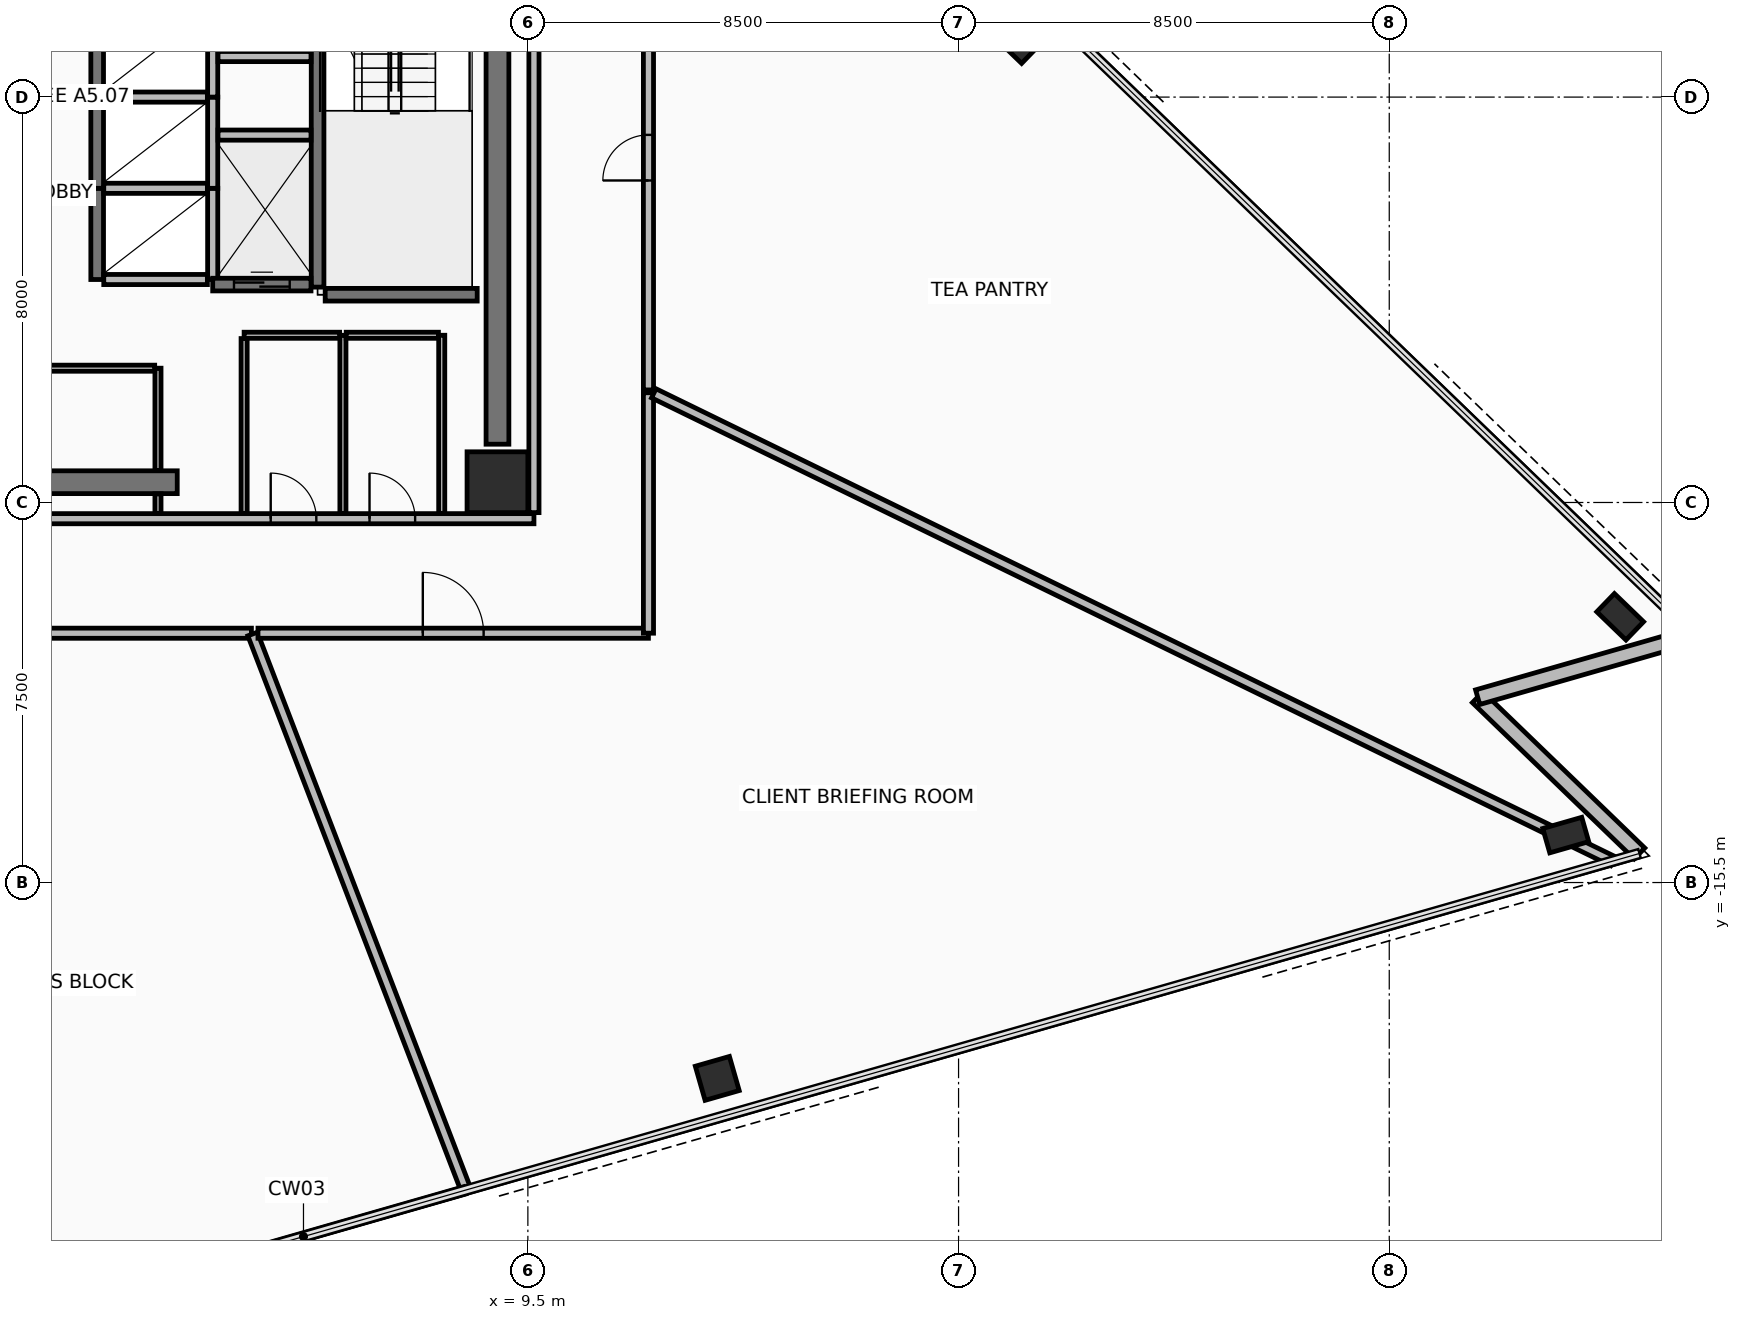
"""IFC4 building model, lengths in metres.
Left out: names, types, materials, properties, quantities, classifications, styles, units other than length and angle.
Written with IfcOpenShell. Run it as: python <this file> out.ifc"""

import sys

from ifc_helpers import new_model, si_unit, direction, frame, frame_2d, origin, origin_2d, place, context, subcontext, project, spatial, rectangle, hollow_rectangle, extrude, element, fill, save


model = new_model("IFC4")
c1 = context("Model", 3, precision=1e-05, world=origin(), true_north=direction((0.0, 1.0)))
c2 = subcontext(c1, "Body", "Model", "MODEL_VIEW")
j1 = project(units=[si_unit("LENGTHUNIT", "METRE"), si_unit("PLANEANGLEUNIT", "RADIAN")], contexts=[c1])
p1 = place(None, origin())
s1 = spatial("IfcSite", under=j1, at=p1, CompositionType="ELEMENT")
p2 = place(p1, origin())
s2 = spatial("IfcBuilding", under=s1, at=p2, CompositionType="ELEMENT")
p3 = place(p2, frame((0.0, 0.0, 86.1)))
s3 = spatial("IfcBuildingStorey", under=s2, at=p3, CompositionType="ELEMENT", Elevation=86.1)
p4 = place(p3, frame((8.9, -7.6, 0.0), z_axis=(0.0, 0.0, 1.0), x_axis=(1.0, 0.0, 0.0)))
e1 = element("IfcColumn", 1, at=p4, inside=s3, PredefinedType="COLUMN", context=c2, shape_type="SweptSolid", body=[
    extrude(rectangle(XDim=1.2, YDim=1.2, at=origin_2d()), origin(), (0.0, 0.0, 1.0), 3.6),
])
p5 = place(p3, frame((13.238, -19.365, 0.0), z_axis=(0.0, 0.0, 1.0), x_axis=(0.961261695938, 0.275637355817, 0.0)))
e2 = element("IfcColumn", 2, at=p5, inside=s3, PredefinedType="COLUMN", context=c2, shape_type="SweptSolid", body=[
    extrude(hollow_rectangle(XDim=0.7, YDim=0.7, WallThickness=0.04, at=origin_2d()), origin(), (0.0, 0.0, 1.0), 3.6),
])
for number, where, z_axis, x_axis in (
    (3, (29.983, -14.564, 0.0), (0.0, 0.0, 1.0), (0.961, 0.276, 0.0)),
    (4, (31.058, -10.256, 0.0), (0.0, 0.0, 1.0), (-0.719, 0.695, 0.0)),
):
    element("IfcColumn", number, at=place(p3, frame(where, z_axis=z_axis, x_axis=x_axis)), inside=s3, PredefinedType="COLUMN", context=c2, shape_type="SweptSolid", body=[
        extrude(hollow_rectangle(XDim=0.5, YDim=0.8, WallThickness=0.04, at=origin_2d()), origin(), (0.0, 0.0, 1.0), 3.6),
    ])
p6 = place(p3, frame((19.236, 1.16, -0.19), z_axis=(0.0, 0.0, 1.0), x_axis=(-0.719339800339, 0.694658370459, 0.0)))
e5 = element("IfcColumn", 5, at=p6, inside=s3, PredefinedType="COLUMN", context=c2, shape_type="SweptSolid", body=[
    extrude(hollow_rectangle(XDim=0.7, YDim=0.7, WallThickness=0.04, at=origin_2d()), origin(), (0.0, 0.0, 1.0), 3.79),
])
p7 = place(p3, frame((31.439, -14.927, 0.0), z_axis=(0.0, 0.0, 1.0), x_axis=(-0.719317126864, 0.694681848763, 0.0)))
e6 = element("IfcWall", 6, at=p7, inside=s3, PredefinedType="STANDARD", context=c2, shape_type="SweptSolid", body=[
    extrude(rectangle(XDim=4.44, YDim=0.3, at=frame_2d((2.22, 0.0))), origin(), (0.0, 0.0, 1.0), 2.605),
])
p8 = place(p3, frame((28.245, -11.842, 0.0), z_axis=(0.0, 0.0, 1.0), x_axis=(0.961255810825, 0.275657878821, 0.0)))
e7 = element("IfcWall", 7, at=p8, inside=s3, PredefinedType="STANDARD", context=c2, shape_type="SweptSolid", body=[
    extrude(rectangle(XDim=4.44, YDim=0.3, at=frame_2d((2.22, 0.0))), origin(), (0.0, 0.0, 1.0), 2.605),
])
p9 = place(p3, frame((-2.8, -7.6, 0.0), z_axis=(0.0, 0.0, 1.0), x_axis=(1.0, 0.0, 0.0)))
e8 = element("IfcWall", 8, at=p9, inside=s3, PredefinedType="SHEAR", context=c2, shape_type="SweptSolid", body=[
    extrude(rectangle(XDim=5.38, YDim=0.45, at=frame_2d((2.69, 0.0))), origin(), (0.0, 0.0, 1.0), 3.41),
])
p10 = place(p3, frame((8.9, -6.85, 0.0), z_axis=(0.0, 0.0, 1.0), x_axis=(0.0, 1.0, 0.0)))
e9 = element("IfcWall", 9, at=p10, inside=s3, PredefinedType="SHEAR", context=c2, shape_type="SweptSolid", body=[
    extrude(rectangle(XDim=10.7, YDim=0.45, at=frame_2d((5.35, 0.0))), origin(), (0.0, 0.0, 1.0), 3.41),
])
p11 = place(p3, frame((-9.62, -8.32, 0.0), z_axis=(0.0, 0.0, 1.0), x_axis=(1.0, 0.0, 0.0)))
e10 = element("IfcWall", 10, at=p11, inside=s3, PredefinedType="PARTITIONING", context=c2, shape_type="SweptSolid", body=[
    extrude(rectangle(XDim=19.24, YDim=0.2, at=frame_2d((9.62, 0.0))), origin(), (0.0, 0.0, 1.0), 2.805),
])
p12 = place(p11, frame((8.57, 0.0, 0.0)))
e11 = element("IfcOpeningElement", 11, at=p12, cuts=e10, PredefinedType="OPENING", context=c2, shape_type="SweptSolid", body=[
    extrude(rectangle(XDim=0.9, YDim=2.1, at=frame_2d((0.45, 1.05))), frame((0.0, 0.11, 0.0), z_axis=(0.0, -1.0, 0.0), x_axis=(1.0, 0.0, 0.0)), (0.0, 0.0, 1.0), 0.22),
])
p13 = place(p11, frame((14.045, 0.0, 0.0)))
e12 = element("IfcOpeningElement", 12, at=p13, cuts=e10, PredefinedType="OPENING", context=c2, shape_type="SweptSolid", body=[
    extrude(rectangle(XDim=0.9, YDim=2.1, at=frame_2d((0.45, 1.05))), frame((0.0, 0.11, 0.0), z_axis=(0.0, -1.0, 0.0), x_axis=(1.0, 0.0, 0.0)), (0.0, 0.0, 1.0), 0.22),
])
p14 = place(p11, frame((15.995, 0.0, 0.0)))
e13 = element("IfcOpeningElement", 13, at=p14, cuts=e10, PredefinedType="OPENING", context=c2, shape_type="SweptSolid", body=[
    extrude(rectangle(XDim=0.9, YDim=2.1, at=frame_2d((0.45, 1.05))), frame((0.0, 0.11, 0.0), z_axis=(0.0, -1.0, 0.0), x_axis=(1.0, 0.0, 0.0)), (0.0, 0.0, 1.0), 0.22),
])
p15 = place(p3, frame((9.62, -8.2, 0.0), z_axis=(0.0, 0.0, 1.0), x_axis=(0.0, 1.0, 0.0)))
e14 = element("IfcWall", 14, at=p15, inside=s3, PredefinedType="PARTITIONING", context=c2, shape_type="SweptSolid", body=[
    extrude(rectangle(XDim=16.4, YDim=0.2, at=frame_2d((8.2, 0.0))), origin(), (0.0, 0.0, 1.0), 2.805),
])
p16 = place(p15, frame((12.65, 0.0, 0.0)))
e15 = element("IfcOpeningElement", 15, at=p16, cuts=e14, PredefinedType="OPENING", context=c2, shape_type="SweptSolid", body=[
    extrude(rectangle(XDim=1.1, YDim=2.15, at=frame_2d((0.55, 1.075))), frame((0.0, 0.11, 0.0), z_axis=(0.0, -1.0, 0.0), x_axis=(1.0, 0.0, 0.0)), (0.0, 0.0, 1.0), 0.22),
])
p17 = place(p3, frame((5.35, -3.75, 0.0), z_axis=(0.0, 0.0, 1.0), x_axis=(0.0, 1.0, 0.0)))
e16 = element("IfcWall", 16, at=p17, inside=s3, PredefinedType="SHEAR", context=c2, shape_type="SweptSolid", body=[
    extrude(rectangle(XDim=7.3, YDim=0.25, at=frame_2d((3.65, 0.0))), origin(), (0.0, 0.0, 1.0), 3.41),
])
p18 = place(p3, frame((5.5, -3.9, 0.0), z_axis=(0.0, 0.0, 1.0), x_axis=(1.0, 0.0, 0.0)))
e17 = element("IfcWall", 17, at=p18, inside=s3, PredefinedType="SHEAR", context=c2, shape_type="SweptSolid", body=[
    extrude(rectangle(XDim=3.0, YDim=0.25, at=frame_2d((1.5, 0.0))), origin(), (0.0, 0.0, 1.0), 3.41),
])
p19 = place(p3, frame((1.0, -3.6, 0.0), z_axis=(0.0, 0.0, 1.0), x_axis=(0.0, 1.0, 0.0)))
e18 = element("IfcWall", 18, at=p19, inside=s3, PredefinedType="SHEAR", context=c2, shape_type="SweptSolid", body=[
    extrude(rectangle(XDim=1.8, YDim=0.25, at=frame_2d((0.9, 0.0))), origin(), (0.0, 0.0, 1.0), 3.41),
])
p20 = place(p3, frame((3.28, -3.6, 0.0), z_axis=(0.0, 0.0, 1.0), x_axis=(0.0, 1.0, 0.0)))
e19 = element("IfcWall", 19, at=p20, inside=s3, PredefinedType="PARTITIONING", context=c2, shape_type="SweptSolid", body=[
    extrude(rectangle(XDim=1.8, YDim=0.2, at=frame_2d((0.9, 0.0))), origin(), (0.0, 0.0, 1.0), 3.41),
])
for number, where, z_axis, x_axis in (
    (20, (1.13, -3.6, 0.0), (0.0, 0.0, 1.0), (1.0, 0.0, 0.0)),
    (21, (1.13, -1.8, 0.0), (0.0, 0.0, 1.0), (1.0, 0.0, 0.0)),
):
    element("IfcWall", number, at=place(p3, frame(where, z_axis=z_axis, x_axis=x_axis)), inside=s3, PredefinedType="PARTITIONING", context=c2, shape_type="SweptSolid", body=[
        extrude(rectangle(XDim=2.045, YDim=0.2, at=frame_2d((1.022, 0.0))), origin(), (0.0, 0.0, 1.0), 3.41),
    ])
p21 = place(p3, frame((1.0, -1.8, 0.0), z_axis=(0.0, 0.0, 1.0), x_axis=(0.0, 1.0, 0.0)))
e22 = element("IfcWall", 22, at=p21, inside=s3, PredefinedType="SHEAR", context=c2, shape_type="SweptSolid", body=[
    extrude(rectangle(XDim=1.8, YDim=0.25, at=frame_2d((0.9, 0.0))), origin(), (0.0, 0.0, 1.0), 3.41),
])
p22 = place(p3, frame((3.28, -1.8, 0.0), z_axis=(0.0, 0.0, 1.0), x_axis=(0.0, 1.0, 0.0)))
e23 = element("IfcWall", 23, at=p22, inside=s3, PredefinedType="PARTITIONING", context=c2, shape_type="SweptSolid", body=[
    extrude(rectangle(XDim=1.8, YDim=0.2, at=frame_2d((0.9, 0.0))), origin(), (0.0, 0.0, 1.0), 3.41),
])
p23 = place(p3, frame((1.13, 0.0, 0.0), z_axis=(0.0, 0.0, 1.0), x_axis=(1.0, 0.0, 0.0)))
e24 = element("IfcWall", 24, at=p23, inside=s3, PredefinedType="PARTITIONING", context=c2, shape_type="SweptSolid", body=[
    extrude(rectangle(XDim=2.045, YDim=0.2, at=frame_2d((1.022, 0.0))), origin(), (0.0, 0.0, 1.0), 3.41),
])
p24 = place(p3, frame((1.0, 0.0, 0.0), z_axis=(0.0, 0.0, 1.0), x_axis=(0.0, 1.0, 0.0)))
e25 = element("IfcWall", 25, at=p24, inside=s3, PredefinedType="SHEAR", context=c2, shape_type="SweptSolid", body=[
    extrude(rectangle(XDim=1.8, YDim=0.25, at=frame_2d((0.9, 0.0))), origin(), (0.0, 0.0, 1.0), 3.41),
])
p25 = place(p3, frame((3.28, 0.0, 0.0), z_axis=(0.0, 0.0, 1.0), x_axis=(0.0, 1.0, 0.0)))
e26 = element("IfcWall", 26, at=p25, inside=s3, PredefinedType="PARTITIONING", context=c2, shape_type="SweptSolid", body=[
    extrude(rectangle(XDim=1.8, YDim=0.2, at=frame_2d((0.9, 0.0))), origin(), (0.0, 0.0, 1.0), 3.41),
])
p26 = place(p3, frame((3.385, 0.8, 0.0), z_axis=(0.0, 0.0, 1.0), x_axis=(1.0, 0.0, 0.0)))
e27 = element("IfcWall", 27, at=p26, inside=s3, PredefinedType="PARTITIONING", context=c2, shape_type="SweptSolid", body=[
    extrude(rectangle(XDim=1.835, YDim=0.2, at=frame_2d((0.917, 0.0))), origin(), (0.0, 0.0, 1.0), 3.41),
])
p27 = place(p3, frame((3.28, -3.7, 0.0), z_axis=(0.0, 0.0, 1.0), x_axis=(1.0, 0.0, 0.0)))
e28 = element("IfcWall", 28, at=p27, inside=s3, PredefinedType="SHEAR", context=c2, shape_type="SweptSolid", body=[
    extrude(rectangle(XDim=1.94, YDim=0.25, at=frame_2d((0.97, 0.0))), origin(), (0.0, 0.0, 1.0), 3.41),
])
p28 = place(p27, frame((0.42, 0.0, 0.0)))
e29 = element("IfcOpeningElement", 29, at=p28, cuts=e28, PredefinedType="OPENING", context=c2, shape_type="SweptSolid", body=[
    extrude(rectangle(XDim=1.1, YDim=2.2, at=frame_2d((0.55, 1.1))), frame((0.0, 0.135, 0.0), z_axis=(0.0, -1.0, 0.0), x_axis=(1.0, 0.0, 0.0)), (0.0, 0.0, 1.0), 0.27),
])
p29 = place(p3, frame((3.385, -0.75, 0.0), z_axis=(0.0, 0.0, 1.0), x_axis=(1.0, 0.0, 0.0)))
e30 = element("IfcWall", 30, at=p29, inside=s3, PredefinedType="PARTITIONING", context=c2, shape_type="SweptSolid", body=[
    extrude(rectangle(XDim=1.835, YDim=0.2, at=frame_2d((0.917, 0.0))), origin(), (0.0, 0.0, 1.0), 3.41),
])
p30 = place(p3, frame((2.2, -8.215, 0.0), z_axis=(0.0, 0.0, 1.0), x_axis=(0.0, 1.0, 0.0)))
e31 = element("IfcWall", 31, at=p30, inside=s3, PredefinedType="PARTITIONING", context=c2, shape_type="SweptSolid", body=[
    extrude(rectangle(XDim=0.385, YDim=0.12, at=frame_2d((0.192, 0.0))), origin(), (0.0, 0.0, 1.0), 2.605),
])
p31 = place(p3, frame((2.2, -7.37, 0.0), z_axis=(0.0, 0.0, 1.0), x_axis=(0.0, 1.0, 0.0)))
e32 = element("IfcWall", 32, at=p31, inside=s3, PredefinedType="PARTITIONING", context=c2, shape_type="SweptSolid", body=[
    extrude(rectangle(XDim=2.02, YDim=0.12, at=frame_2d((1.01, 0.0))), origin(), (0.0, 0.0, 1.0), 2.605),
])
p32 = place(p3, frame((2.135, -5.35, 0.0), z_axis=(0.0, 0.0, 1.0), x_axis=(-1.0, 0.0, 0.0)))
e33 = element("IfcWall", 33, at=p32, inside=s3, PredefinedType="PARTITIONING", context=c2, shape_type="SweptSolid", body=[
    extrude(rectangle(XDim=5.535, YDim=0.12, at=frame_2d((2.768, 0.0))), origin(), (0.0, 0.0, 1.0), 2.605),
])
p33 = place(p3, frame((5.85, -8.215, 0.0), z_axis=(0.0, 0.0, 1.0), x_axis=(0.0, 1.0, 0.0)))
e34 = element("IfcWall", 34, at=p33, inside=s3, PredefinedType="PARTITIONING", context=c2, shape_type="SweptSolid", body=[
    extrude(rectangle(XDim=3.515, YDim=0.12, at=frame_2d((1.758, 0.0))), origin(), (0.0, 0.0, 1.0), 2.605),
])
p34 = place(p3, frame((5.785, -4.7, 0.0), z_axis=(0.0, 0.0, 1.0), x_axis=(-1.0, 0.0, 0.0)))
e35 = element("IfcWall", 35, at=p34, inside=s3, PredefinedType="PARTITIONING", context=c2, shape_type="SweptSolid", body=[
    extrude(rectangle(XDim=1.885, YDim=0.12, at=frame_2d((0.942, 0.0))), origin(), (0.0, 0.0, 1.0), 3.41),
])
p35 = place(p3, frame((3.9, -4.765, 0.0), z_axis=(0.0, 0.0, 1.0), x_axis=(0.0, -1.0, 0.0)))
e36 = element("IfcWall", 36, at=p35, inside=s3, PredefinedType="PARTITIONING", context=c2, shape_type="SweptSolid", body=[
    extrude(rectangle(XDim=3.45, YDim=0.12, at=frame_2d((1.725, 0.0))), origin(), (0.0, 0.0, 1.0), 2.605),
])
p36 = place(p3, frame((7.8, -8.215, 0.0), z_axis=(0.0, 0.0, 1.0), x_axis=(0.0, 1.0, 0.0)))
e37 = element("IfcWall", 37, at=p36, inside=s3, PredefinedType="PARTITIONING", context=c2, shape_type="SweptSolid", body=[
    extrude(rectangle(XDim=3.515, YDim=0.12, at=frame_2d((1.758, 0.0))), origin(), (0.0, 0.0, 1.0), 2.605),
])
p37 = place(p3, frame((7.735, -4.7, 0.0), z_axis=(0.0, 0.0, 1.0), x_axis=(-1.0, 0.0, 0.0)))
e38 = element("IfcWall", 38, at=p37, inside=s3, PredefinedType="PARTITIONING", context=c2, shape_type="SweptSolid", body=[
    extrude(rectangle(XDim=1.82, YDim=0.12, at=frame_2d((0.91, 0.0))), origin(), (0.0, 0.0, 1.0), 3.41),
])
p38 = place(p3, frame((-5.145, -10.58, 0.0), z_axis=(0.0, 0.0, 1.0), x_axis=(1.0, 0.0, 0.0)))
e39 = element("IfcWall", 39, at=p38, inside=s3, PredefinedType="PARTITIONING", context=c2, shape_type="SweptSolid", body=[
    extrude(rectangle(XDim=9.189, YDim=0.2, at=frame_2d((4.594, 0.0))), origin(), (0.0, 0.0, 1.0), 2.805),
])
p39 = place(p38, frame((4.169, 0.0, 0.0)))
e40 = element("IfcOpeningElement", 40, at=p39, cuts=e39, PredefinedType="OPENING", context=c2, shape_type="SweptSolid", body=[
    extrude(rectangle(XDim=0.85, YDim=2.1, at=frame_2d((0.425, 1.05))), frame((0.0, 0.11, 0.0), z_axis=(0.0, -1.0, 0.0), x_axis=(1.0, 0.0, 0.0)), (0.0, 0.0, 1.0), 0.22),
])
p40 = place(p3, frame((4.067, -10.596, 0.0), z_axis=(0.0, 0.0, 1.0), x_axis=(0.358376224971, -0.933577249817, 0.0)))
e41 = element("IfcWall", 41, at=p40, inside=s3, PredefinedType="PARTITIONING", context=c2, shape_type="SweptSolid", body=[
    extrude(rectangle(XDim=11.725, YDim=0.2, at=frame_2d((5.862, 0.0))), origin(), (0.0, 0.0, 1.0), 2.605),
])
p41 = place(p3, frame((8.253, -21.575, 0.0), z_axis=(0.0, 0.0, 1.0), x_axis=(-0.961261412197, -0.275638345338, 0.0)))
e42 = element("IfcWall", 42, at=p41, inside=s3, PredefinedType="PARTITIONING", context=c2, shape_type="SweptSolid", body=[
    extrude(rectangle(XDim=22.567, YDim=0.15, at=frame_2d((11.283, 0.0))), origin(), (0.0, 0.0, 1.0), 3.41),
])
p42 = place(p3, frame((4.174, -10.58, 0.0), z_axis=(0.0, 0.0, 1.0), x_axis=(1.0, 0.0, 0.0)))
e43 = element("IfcWall", 43, at=p42, inside=s3, PredefinedType="PARTITIONING", context=c2, shape_type="SweptSolid", body=[
    extrude(rectangle(XDim=7.706, YDim=0.2, at=frame_2d((3.853, 0.0))), origin(), (0.0, 0.0, 1.0), 2.805),
])
p43 = place(p42, frame((3.253, 0.0, 0.0)))
e44 = element("IfcOpeningElement", 44, at=p43, cuts=e43, PredefinedType="OPENING", context=c2, shape_type="SweptSolid", body=[
    extrude(rectangle(XDim=1.2, YDim=2.15, at=frame_2d((0.6, 1.075))), frame((0.0, 0.11, 0.0), z_axis=(0.0, -1.0, 0.0), x_axis=(1.0, 0.0, 0.0)), (0.0, 0.0, 1.0), 0.22),
])
p44 = place(p3, frame((11.88, -10.579, 0.0), z_axis=(0.0, 0.0, 1.0), x_axis=(0.0, 1.0, 0.0)))
e45 = element("IfcWall", 45, at=p44, inside=s3, PredefinedType="PARTITIONING", context=c2, shape_type="SweptSolid", body=[
    extrude(rectangle(XDim=4.745, YDim=0.2, at=frame_2d((2.373, 0.0))), origin(), (0.0, 0.0, 1.0), 2.805),
])
p45 = place(p3, frame((11.985, -5.845, 0.0), z_axis=(0.0, 0.0, 1.0), x_axis=(0.898791396377, -0.438376579894, 0.0)))
e46 = element("IfcWall", 46, at=p45, inside=s3, PredefinedType="PARTITIONING", context=c2, shape_type="SweptSolid", body=[
    extrude(rectangle(XDim=21.059, YDim=0.2, at=frame_2d((10.53, 0.0))), origin(), (0.0, 0.0, 1.0), 2.605),
])
p46 = place(p3, frame((11.88, -5.779, 0.0), z_axis=(0.0, 0.0, 1.0), x_axis=(0.0, 1.0, 0.0)))
e47 = element("IfcWall", 47, at=p46, inside=s3, PredefinedType="PARTITIONING", context=c2, shape_type="SweptSolid", body=[
    extrude(rectangle(XDim=9.166, YDim=0.2, at=frame_2d((4.583, 0.0))), origin(), (0.0, 0.0, 1.0), 3.41),
])
p47 = place(p46, frame((4.133, 0.0, 0.0)))
e48 = element("IfcOpeningElement", 48, at=p47, cuts=e47, PredefinedType="OPENING", context=c2, shape_type="SweptSolid", body=[
    extrude(rectangle(XDim=0.9, YDim=2.1, at=frame_2d((0.45, 1.05))), frame((0.0, 0.11, 0.0), z_axis=(0.0, -1.0, 0.0), x_axis=(1.0, 0.0, 0.0)), (0.0, 0.0, 1.0), 0.22),
])
p48 = place(p28, origin())
e49 = element("IfcDoor", 49, at=p48, inside=s3, OperationType="SLIDING_TO_LEFT", PredefinedType="DOOR", context=c2, shape_type="SweptSolid", body=[
    extrude(rectangle(XDim=1.1, YDim=2.2, at=frame_2d((0.55, 1.1))), frame((0.0, 0.025, 0.0), z_axis=(0.0, -1.0, 0.0), x_axis=(1.0, 0.0, 0.0)), (0.0, 0.0, 1.0), 0.05),
])
fill(e29, e49)
p49 = place(p13, origin())
e50 = element("IfcDoor", 50, at=p49, inside=s3, OperationType="SINGLE_SWING_LEFT", PredefinedType="DOOR", context=c2, shape_type="SweptSolid", body=[
    extrude(rectangle(XDim=0.9, YDim=2.1, at=frame_2d((0.45, 1.05))), frame((0.0, 0.025, 0.0), z_axis=(0.0, -1.0, 0.0), x_axis=(1.0, 0.0, 0.0)), (0.0, 0.0, 1.0), 0.05),
])
fill(e12, e50)
p50 = place(p14, origin())
e51 = element("IfcDoor", 51, at=p50, inside=s3, OperationType="SINGLE_SWING_LEFT", PredefinedType="DOOR", context=c2, shape_type="SweptSolid", body=[
    extrude(rectangle(XDim=0.9, YDim=2.1, at=frame_2d((0.45, 1.05))), frame((0.0, 0.025, 0.0), z_axis=(0.0, -1.0, 0.0), x_axis=(1.0, 0.0, 0.0)), (0.0, 0.0, 1.0), 0.05),
])
fill(e13, e51)
p51 = place(p43, origin())
e52 = element("IfcDoor", 52, at=p51, inside=s3, OperationType="SINGLE_SWING_LEFT", PredefinedType="DOOR", context=c2, shape_type="SweptSolid", body=[
    extrude(rectangle(XDim=1.2, YDim=2.15, at=frame_2d((0.6, 1.075))), frame((0.0, 0.025, 0.0), z_axis=(0.0, -1.0, 0.0), x_axis=(1.0, 0.0, 0.0)), (0.0, 0.0, 1.0), 0.05),
])
fill(e44, e52)
p52 = place(p47, origin())
e53 = element("IfcDoor", 53, at=p52, inside=s3, OperationType="SINGLE_SWING_LEFT", PredefinedType="DOOR", context=c2, shape_type="SweptSolid", body=[
    extrude(rectangle(XDim=0.9, YDim=2.1, at=frame_2d((0.45, 1.05))), frame((0.0, 0.025, 0.0), z_axis=(0.0, -1.0, 0.0), x_axis=(1.0, 0.0, 0.0)), (0.0, 0.0, 1.0), 0.05),
])
fill(e48, e53)
save(model, sys.argv[1])
